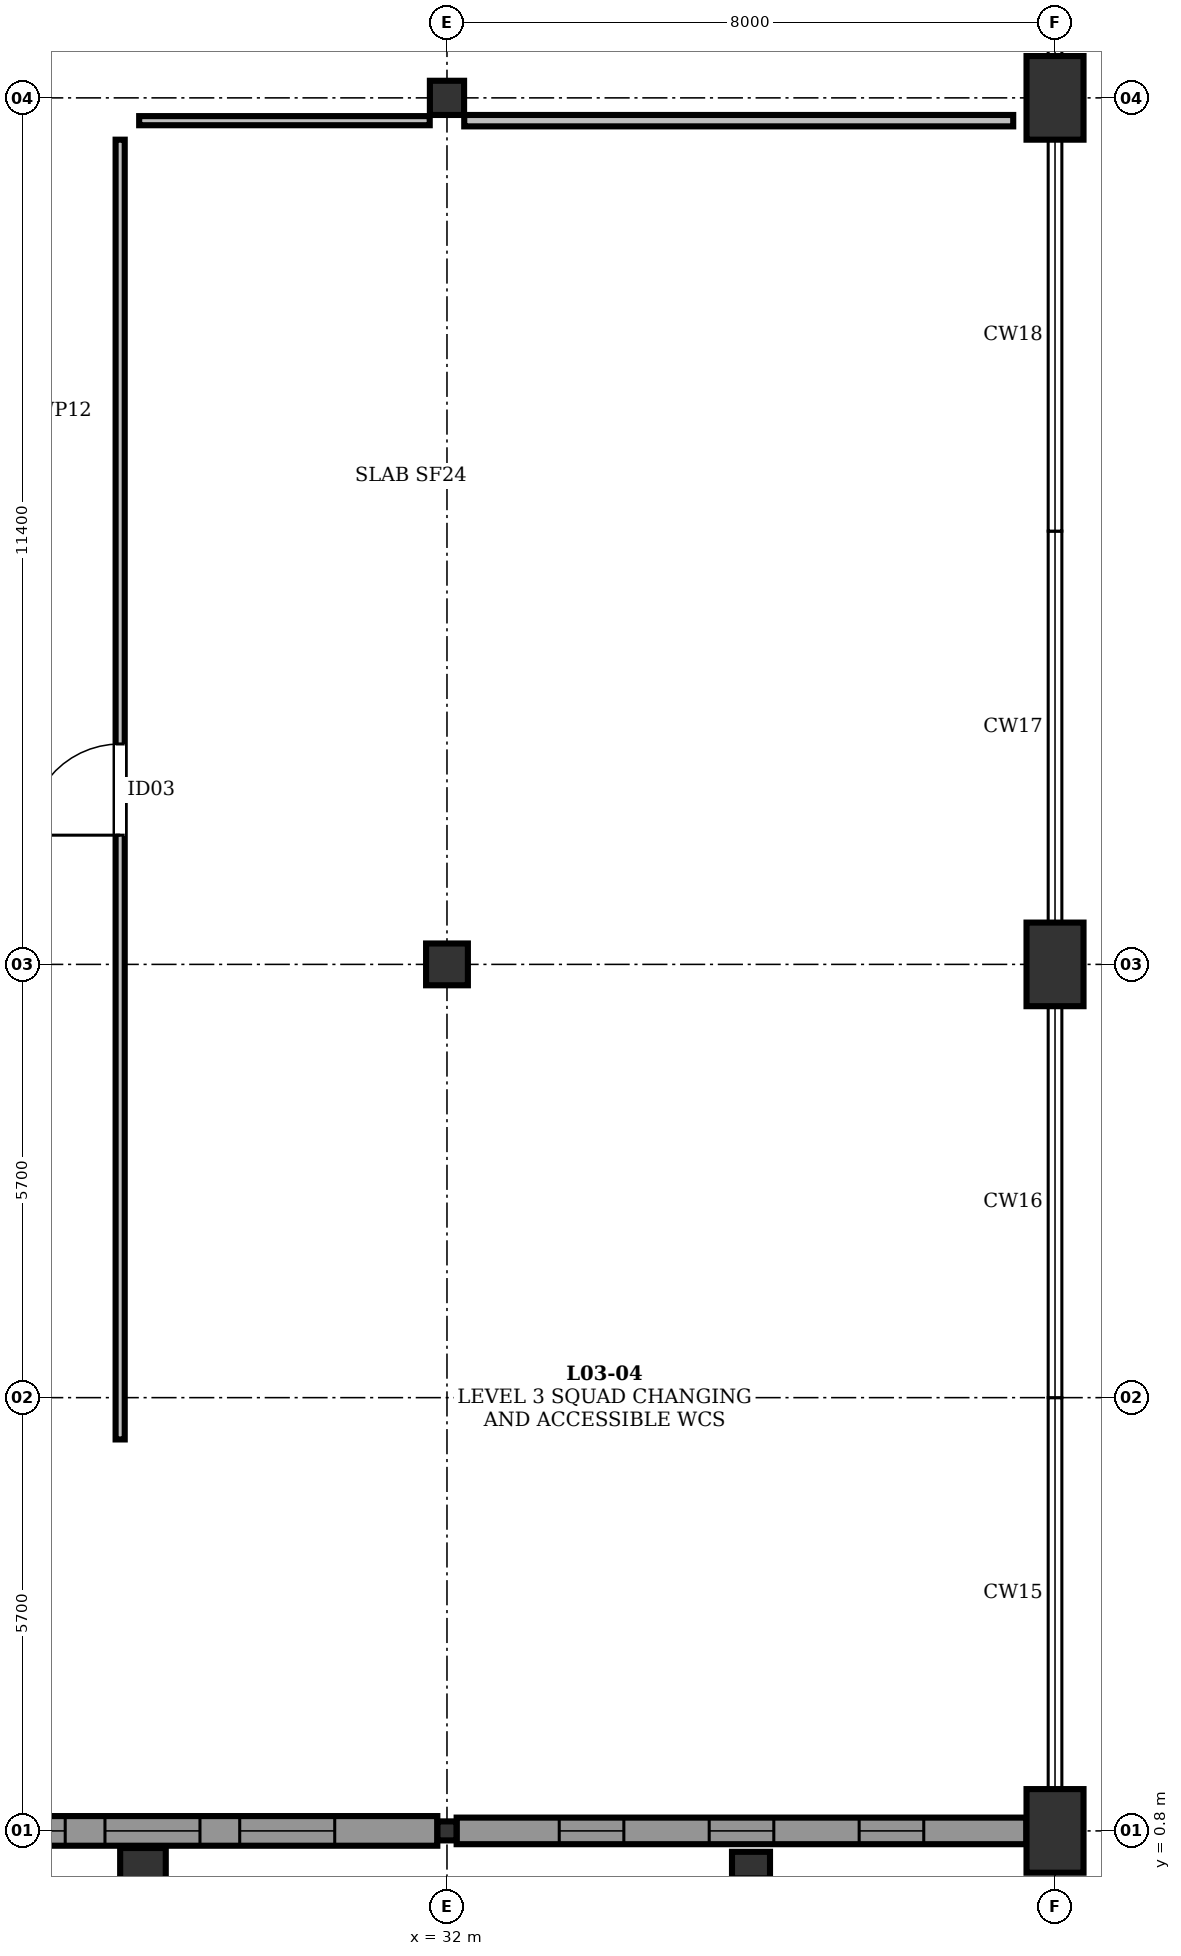
"""IFC4 building model, lengths in metres.
Left out: names, types, materials, properties, quantities, classifications, styles, units other than length and angle.
Written with IfcOpenShell. Run it as: python <this file> out.ifc"""

import sys

from ifc_helpers import new_model, si_unit, direction, frame, frame_2d, origin, origin_2d, place, context, subcontext, project, spatial, rectangle, hollow_rectangle, extrude, element, fill, save


model = new_model("IFC4")
c1 = context("Model", 3, precision=1e-05, world=origin(), true_north=direction((0.0, 1.0)))
c2 = subcontext(c1, "Body", "Model", "MODEL_VIEW")
j1 = project(units=[si_unit("LENGTHUNIT", "METRE"), si_unit("PLANEANGLEUNIT", "RADIAN")], contexts=[c1])
p1 = place(None, origin())
s1 = spatial("IfcSite", under=j1, at=p1, CompositionType="ELEMENT")
p2 = place(p1, origin())
s2 = spatial("IfcBuilding", under=s1, at=p2, CompositionType="ELEMENT")
p3 = place(p2, frame((0.0, 0.0, 14.7)))
s3 = spatial("IfcBuildingStorey", under=s2, at=p3, CompositionType="ELEMENT", Elevation=14.7)
p4 = place(p3, frame((32.0, 0.8, 0.0), z_axis=(0.0, 0.0, 1.0), x_axis=(1.0, 0.0, 0.0)))
e1 = element("IfcColumn", 1, at=p4, inside=s3, PredefinedType="COLUMN", context=c2, shape_type="SweptSolid", body=[
    extrude(hollow_rectangle(XDim=0.25, YDim=0.25, WallThickness=0.012, at=origin_2d()), origin(), (0.0, 0.0, 1.0), 4.5),
])
p5 = place(p3, frame((32.0, 12.2, 0.0), z_axis=(0.0, 0.0, 1.0), x_axis=(1.0, 0.0, 0.0)))
e2 = element("IfcColumn", 2, at=p5, inside=s3, PredefinedType="COLUMN", context=c2, shape_type="SweptSolid", body=[
    extrude(rectangle(XDim=0.55, YDim=0.55, at=origin_2d()), origin(), (0.0, 0.0, 1.0), 4.5),
])
p6 = place(p3, frame((32.0, 23.6, 0.0), z_axis=(0.0, 0.0, 1.0), x_axis=(1.0, 0.0, 0.0)))
e3 = element("IfcColumn", 3, at=p6, inside=s3, PredefinedType="COLUMN", context=c2, shape_type="SweptSolid", body=[
    extrude(rectangle(XDim=0.45, YDim=0.45, at=origin_2d()), origin(), (0.0, 0.0, 1.0), 4.5),
])
for number, where, z_axis, x_axis in (
    (4, (40.0, 0.8, 0.0), (0.0, 0.0, 1.0), (1.0, 0.0, 0.0)),
    (5, (40.0, 12.2, 0.0), (0.0, 0.0, 1.0), (1.0, 0.0, 0.0)),
    (6, (40.0, 23.6, 0.0), (0.0, 0.0, 1.0), (1.0, 0.0, 0.0)),
):
    element("IfcColumn", number, at=place(p3, frame(where, z_axis=z_axis, x_axis=x_axis)), inside=s3, PredefinedType="COLUMN", context=c2, shape_type="SweptSolid", body=[
        extrude(rectangle(XDim=0.75, YDim=1.1, at=origin_2d()), origin(), (0.0, 0.0, 1.0), 4.5),
    ])
p7 = place(p3, frame((28.0, 0.35, 0.0), z_axis=(0.0, 0.0, 1.0), x_axis=(0.0, 1.0, 0.0)))
e7 = element("IfcColumn", 7, at=p7, inside=s3, PredefinedType="PILASTER", context=c2, shape_type="SweptSolid", body=[
    extrude(rectangle(XDim=0.45, YDim=0.6, at=origin_2d()), origin(), (0.0, 0.0, 1.0), 4.5),
])
p8 = place(p3, frame((36.0, 0.35, 0.0), z_axis=(0.0, 0.0, 1.0), x_axis=(0.0, 1.0, 0.0)))
e8 = element("IfcColumn", 8, at=p8, inside=s3, PredefinedType="PILASTER", context=c2, shape_type="SweptSolid", body=[
    extrude(rectangle(XDim=0.35, YDim=0.5, at=origin_2d()), origin(), (0.0, 0.0, 1.0), 5.25),
])
p9 = place(p3, frame((24.377, 0.8, 0.0), z_axis=(0.0, 0.0, 1.0), x_axis=(1.0, 0.0, 0.0)))
e9 = element("IfcWall", 9, at=p9, inside=s3, PredefinedType="STANDARD", context=c2, shape_type="SweptSolid", body=[
    extrude(rectangle(XDim=7.496, YDim=0.39, at=frame_2d((3.748, 0.0))), origin(), (0.0, 0.0, 1.0), 3.545),
])
p10 = place(p9, frame((1.35, 0.0, 0.75)))
e10 = element("IfcOpeningElement", 10, at=p10, cuts=e9, PredefinedType="OPENING", context=c2, shape_type="SweptSolid", body=[
    extrude(rectangle(XDim=1.25, YDim=2.5, at=frame_2d((0.625, 1.25))), frame((0.0, 0.207, 0.0), z_axis=(0.0, -1.0, 0.0), x_axis=(1.0, 0.0, 0.0)), (0.0, 0.0, 1.0), 0.414),
])
p11 = place(p9, frame((3.123, 0.0, 0.75)))
e11 = element("IfcOpeningElement", 11, at=p11, cuts=e9, PredefinedType="OPENING", context=c2, shape_type="SweptSolid", body=[
    extrude(rectangle(XDim=1.25, YDim=2.5, at=frame_2d((0.625, 1.25))), frame((0.0, 0.207, 0.0), z_axis=(0.0, -1.0, 0.0), x_axis=(1.0, 0.0, 0.0)), (0.0, 0.0, 1.0), 0.414),
])
p12 = place(p9, frame((4.896, 0.0, 0.75)))
e12 = element("IfcOpeningElement", 12, at=p12, cuts=e9, PredefinedType="OPENING", context=c2, shape_type="SweptSolid", body=[
    extrude(rectangle(XDim=1.25, YDim=2.5, at=frame_2d((0.625, 1.25))), frame((0.0, 0.207, 0.0), z_axis=(0.0, -1.0, 0.0), x_axis=(1.0, 0.0, 0.0)), (0.0, 0.0, 1.0), 0.414),
])
p13 = place(p3, frame((32.127, 0.8, 0.0), z_axis=(0.0, 0.0, 1.0), x_axis=(1.0, 0.0, 0.0)))
e13 = element("IfcWall", 13, at=p13, inside=s3, PredefinedType="STANDARD", context=c2, shape_type="SweptSolid", body=[
    extrude(rectangle(XDim=7.496, YDim=0.35, at=frame_2d((3.748, 0.0))), origin(), (0.0, 0.0, 1.0), 3.545),
])
p14 = place(p13, frame((1.35, 0.0, 0.75)))
e14 = element("IfcOpeningElement", 14, at=p14, cuts=e13, PredefinedType="OPENING", context=c2, shape_type="SweptSolid", body=[
    extrude(rectangle(XDim=0.85, YDim=1.75, at=frame_2d((0.425, 0.875))), frame((0.0, 0.187, 0.0), z_axis=(0.0, -1.0, 0.0), x_axis=(1.0, 0.0, 0.0)), (0.0, 0.0, 1.0), 0.374),
])
p15 = place(p13, frame((3.323, 0.0, 0.75)))
e15 = element("IfcOpeningElement", 15, at=p15, cuts=e13, PredefinedType="OPENING", context=c2, shape_type="SweptSolid", body=[
    extrude(rectangle(XDim=0.85, YDim=1.75, at=frame_2d((0.425, 0.875))), frame((0.0, 0.187, 0.0), z_axis=(0.0, -1.0, 0.0), x_axis=(1.0, 0.0, 0.0)), (0.0, 0.0, 1.0), 0.374),
])
p16 = place(p13, frame((5.296, 0.0, 0.75)))
e16 = element("IfcOpeningElement", 16, at=p16, cuts=e13, PredefinedType="OPENING", context=c2, shape_type="SweptSolid", body=[
    extrude(rectangle(XDim=0.85, YDim=1.75, at=frame_2d((0.425, 0.875))), frame((0.0, 0.187, 0.0), z_axis=(0.0, -1.0, 0.0), x_axis=(1.0, 0.0, 0.0)), (0.0, 0.0, 1.0), 0.374),
])
p17 = place(p3, frame((27.7, 5.95, 0.0), z_axis=(0.0, 0.0, 1.0), x_axis=(0.0, 1.0, 0.0)))
e17 = element("IfcWall", 17, at=p17, inside=s3, PredefinedType="PARTITIONING", context=c2, shape_type="SweptSolid", body=[
    extrude(rectangle(XDim=17.1, YDim=0.12, at=frame_2d((8.55, 0.0))), origin(), (0.0, 0.0, 1.0), 3.345),
])
p18 = place(p17, frame((7.95, 0.0, 0.0)))
e18 = element("IfcOpeningElement", 18, at=p18, cuts=e17, PredefinedType="OPENING", context=c2, shape_type="SweptSolid", body=[
    extrude(rectangle(XDim=1.2, YDim=2.15, at=frame_2d((0.6, 1.075))), frame((0.0, 0.072, 0.0), z_axis=(0.0, -1.0, 0.0), x_axis=(1.0, 0.0, 0.0)), (0.0, 0.0, 1.0), 0.144),
])
p19 = place(p3, frame((27.95, 23.3, 0.0), z_axis=(0.0, 0.0, 1.0), x_axis=(1.0, 0.0, 0.0)))
e19 = element("IfcWall", 19, at=p19, inside=s3, PredefinedType="PARTITIONING", context=c2, shape_type="SweptSolid", body=[
    extrude(rectangle(XDim=3.823, YDim=0.12, at=frame_2d((1.912, 0.0))), origin(), (0.0, 0.0, 1.0), 3.345),
])
p20 = place(p3, frame((32.227, 23.3, 0.0), z_axis=(0.0, 0.0, 1.0), x_axis=(1.0, 0.0, 0.0)))
e20 = element("IfcWall", 20, at=p20, inside=s3, PredefinedType="PARTITIONING", context=c2, shape_type="SweptSolid", body=[
    extrude(rectangle(XDim=7.223, YDim=0.15, at=frame_2d((3.611, 0.0))), origin(), (0.0, 0.0, 1.0), 3.345),
])
p21 = place(p10, origin())
e21 = element("IfcWindow", 21, at=p21, inside=s3, PartitioningType="SINGLE_PANEL", PredefinedType="WINDOW", context=c2, shape_type="SweptSolid", body=[
    extrude(rectangle(XDim=1.25, YDim=2.5, at=frame_2d((0.625, 1.25))), frame((0.0, 0.08, 0.0), z_axis=(0.0, -1.0, 0.0), x_axis=(1.0, 0.0, 0.0)), (0.0, 0.0, 1.0), 0.06),
])
fill(e10, e21)
p22 = place(p11, origin())
e22 = element("IfcWindow", 22, at=p22, inside=s3, PartitioningType="SINGLE_PANEL", PredefinedType="WINDOW", context=c2, shape_type="SweptSolid", body=[
    extrude(rectangle(XDim=1.25, YDim=2.5, at=frame_2d((0.625, 1.25))), frame((0.0, 0.08, 0.0), z_axis=(0.0, -1.0, 0.0), x_axis=(1.0, 0.0, 0.0)), (0.0, 0.0, 1.0), 0.06),
])
fill(e11, e22)
p23 = place(p12, origin())
e23 = element("IfcWindow", 23, at=p23, inside=s3, PartitioningType="SINGLE_PANEL", PredefinedType="WINDOW", context=c2, shape_type="SweptSolid", body=[
    extrude(rectangle(XDim=1.25, YDim=2.5, at=frame_2d((0.625, 1.25))), frame((0.0, 0.08, 0.0), z_axis=(0.0, -1.0, 0.0), x_axis=(1.0, 0.0, 0.0)), (0.0, 0.0, 1.0), 0.06),
])
fill(e12, e23)
p24 = place(p14, origin())
e24 = element("IfcWindow", 24, at=p24, inside=s3, PartitioningType="SINGLE_PANEL", PredefinedType="WINDOW", context=c2, shape_type="SweptSolid", body=[
    extrude(rectangle(XDim=0.85, YDim=1.75, at=frame_2d((0.425, 0.875))), frame((0.0, 0.08, 0.0), z_axis=(0.0, -1.0, 0.0), x_axis=(1.0, 0.0, 0.0)), (0.0, 0.0, 1.0), 0.06),
])
fill(e14, e24)
p25 = place(p15, origin())
e25 = element("IfcWindow", 25, at=p25, inside=s3, PartitioningType="SINGLE_PANEL", PredefinedType="WINDOW", context=c2, shape_type="SweptSolid", body=[
    extrude(rectangle(XDim=0.85, YDim=1.75, at=frame_2d((0.425, 0.875))), frame((0.0, 0.08, 0.0), z_axis=(0.0, -1.0, 0.0), x_axis=(1.0, 0.0, 0.0)), (0.0, 0.0, 1.0), 0.06),
])
fill(e15, e25)
p26 = place(p16, origin())
e26 = element("IfcWindow", 26, at=p26, inside=s3, PartitioningType="SINGLE_PANEL", PredefinedType="WINDOW", context=c2, shape_type="SweptSolid", body=[
    extrude(rectangle(XDim=0.85, YDim=1.75, at=frame_2d((0.425, 0.875))), frame((0.0, 0.08, 0.0), z_axis=(0.0, -1.0, 0.0), x_axis=(1.0, 0.0, 0.0)), (0.0, 0.0, 1.0), 0.06),
])
fill(e16, e26)
p27 = place(p18, origin())
e27 = element("IfcDoor", 27, at=p27, inside=s3, OperationType="SINGLE_SWING_LEFT", PredefinedType="DOOR", context=c2, shape_type="SweptSolid", body=[
    extrude(rectangle(XDim=1.2, YDim=2.15, at=frame_2d((0.6, 1.075))), frame((0.0, 0.025, 0.0), z_axis=(0.0, -1.0, 0.0), x_axis=(1.0, 0.0, 0.0)), (0.0, 0.0, 1.0), 0.05),
])
fill(e18, e27)
save(model, sys.argv[1])
